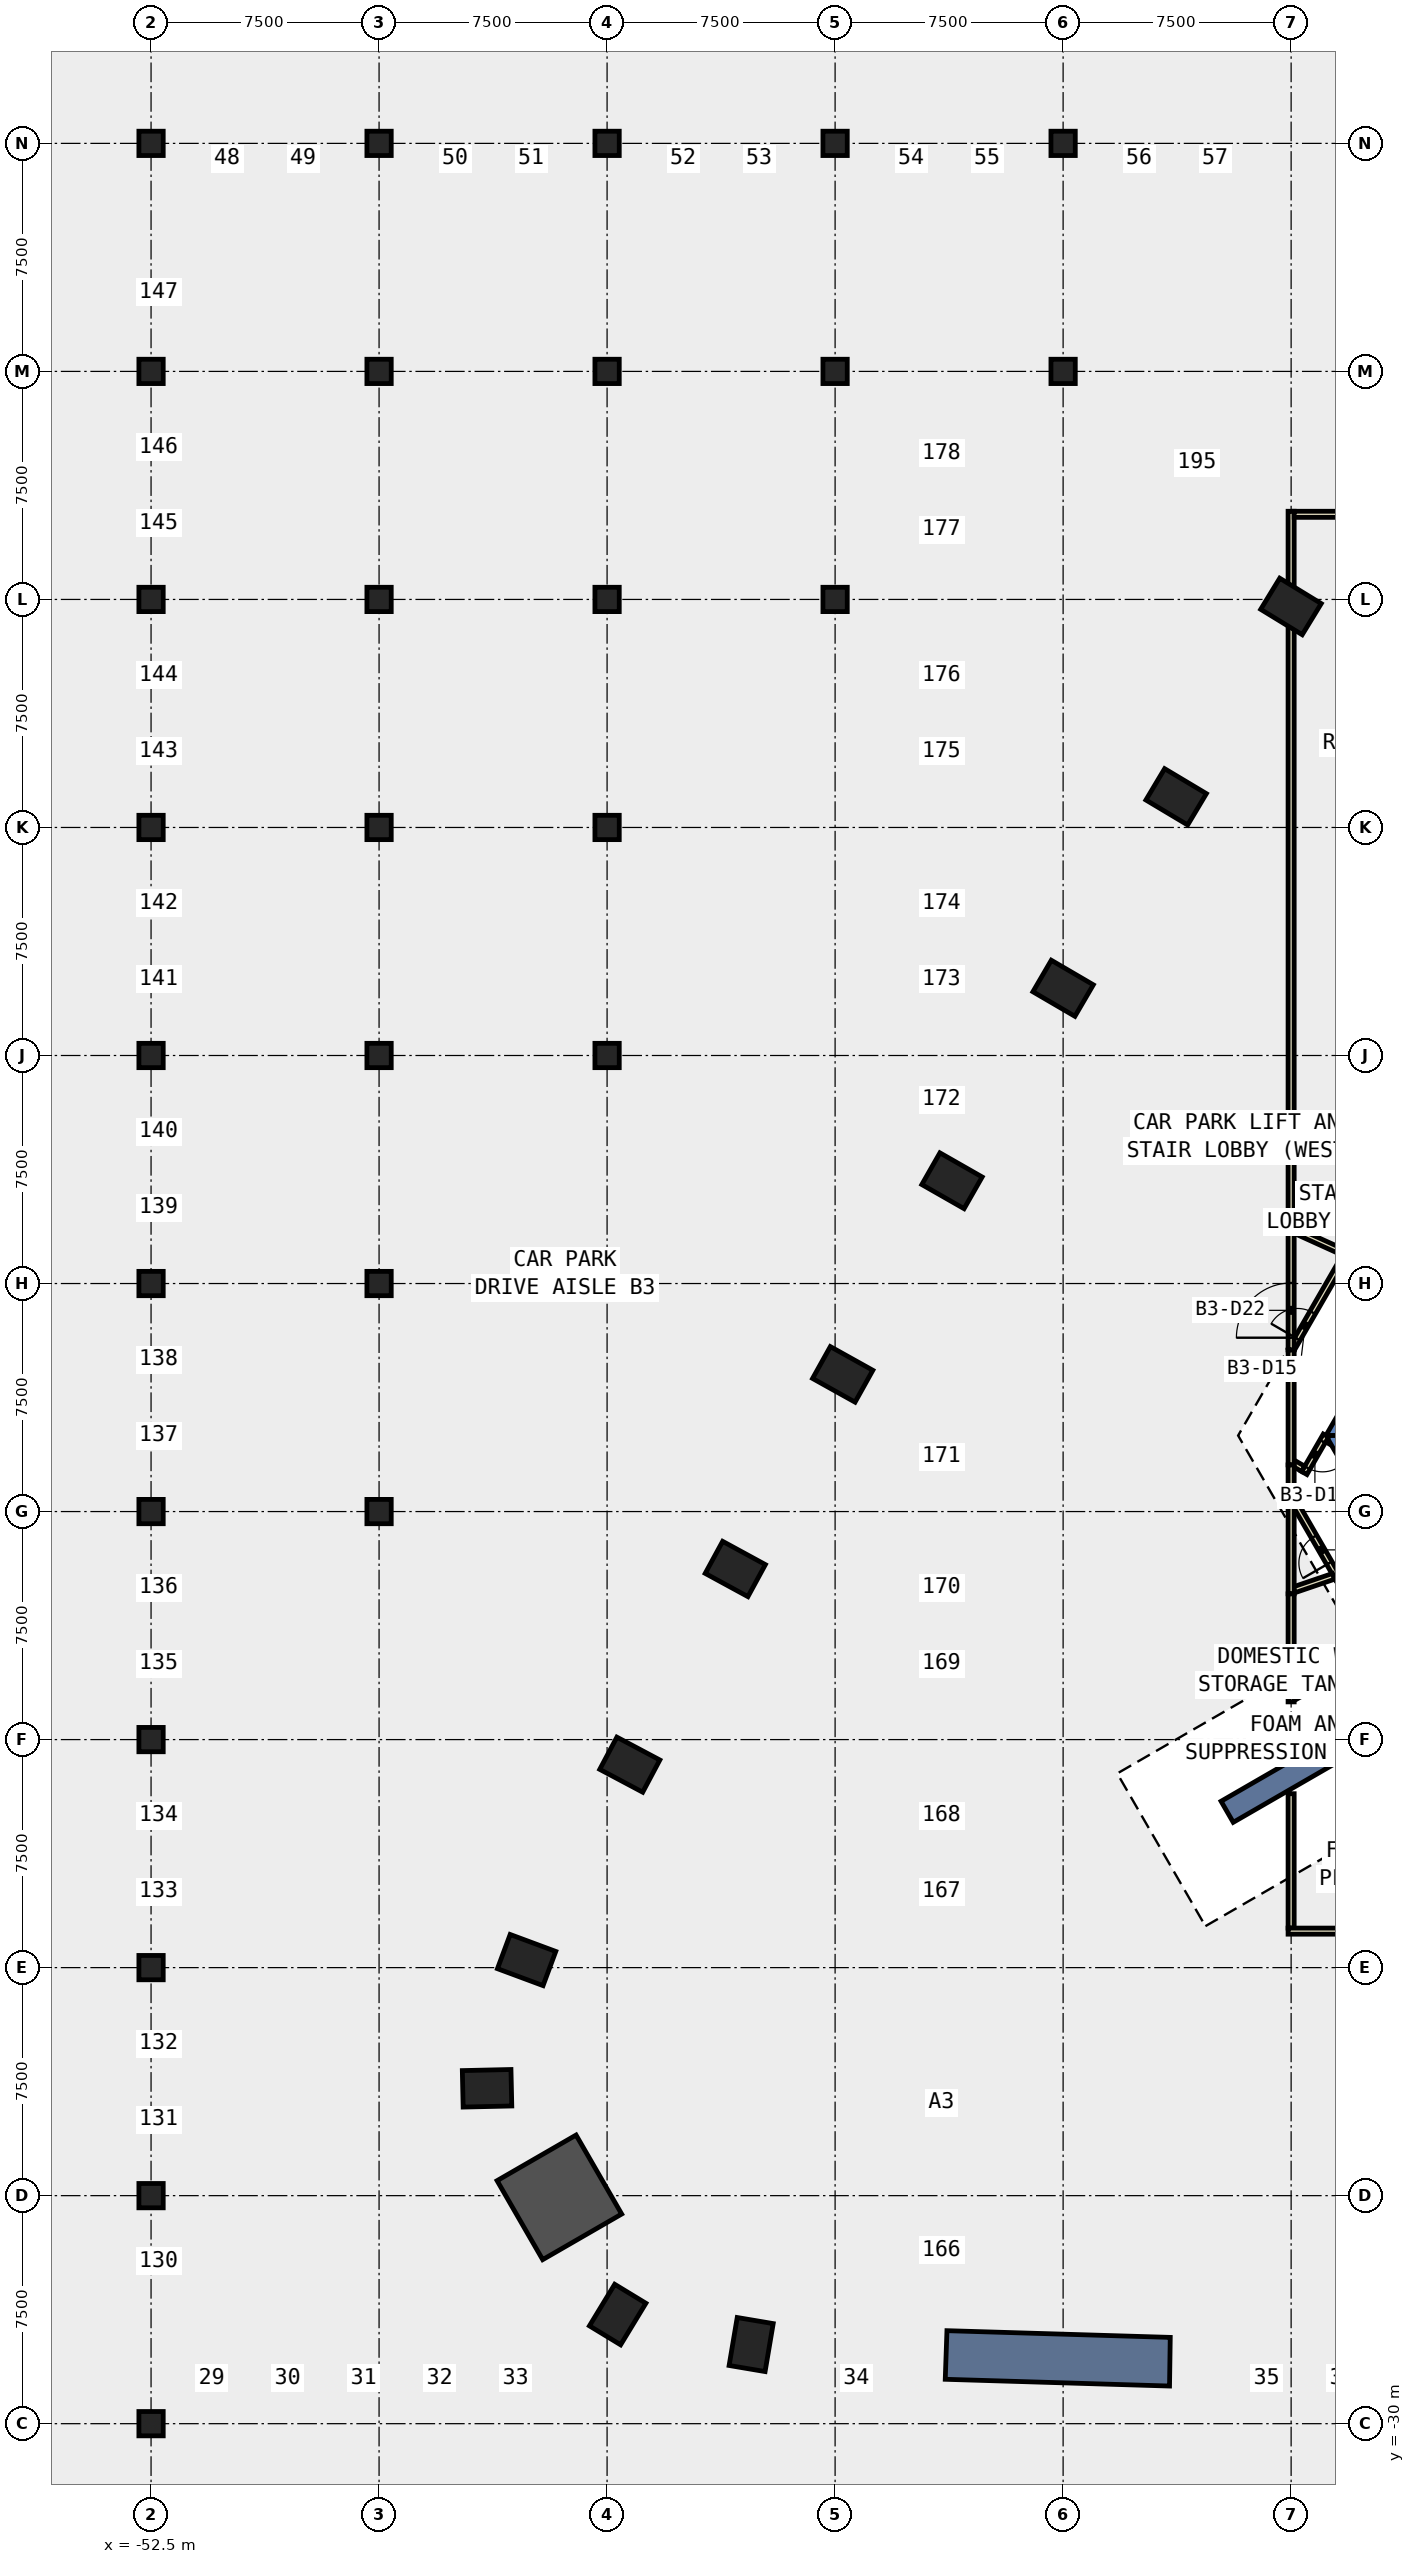
"""IFC4 building model, lengths in metres.
Left out: names, types, materials, properties, quantities, classifications, styles, units other than length and angle.
Written with IfcOpenShell. Run it as: python <this file> out.ifc"""

import sys

from ifc_helpers import new_model, si_unit, direction, frame, frame_2d, origin, origin_2d, place, context, subcontext, project, spatial, polyline, rectangle, outline, extrude, element, fill, save


model = new_model("IFC4")
c1 = context("Model", 3, precision=1e-05, world=origin(), true_north=direction((0.0, 1.0)))
c2 = subcontext(c1, "Body", "Model", "MODEL_VIEW")
j1 = project(units=[si_unit("LENGTHUNIT", "METRE"), si_unit("PLANEANGLEUNIT", "RADIAN")], contexts=[c1])
p1 = place(None, origin())
s1 = spatial("IfcSite", under=j1, at=p1, CompositionType="ELEMENT")
p2 = place(p1, origin())
s2 = spatial("IfcBuilding", under=s1, at=p2, CompositionType="ELEMENT")
p3 = place(p2, frame((0.0, 0.0, -16.5)))
s3 = spatial("IfcBuildingStorey", under=s2, at=p3, CompositionType="ELEMENT", Elevation=-16.5)
for number, where, z_axis, x_axis in (
    (1, (-52.5, -30.0, -0.4), (0.0, 0.0, 1.0), (1.0, 0.0, 0.0)),
    (2, (-52.5, -22.5, -0.4), (0.0, 0.0, 1.0), (1.0, 0.0, 0.0)),
    (3, (-52.5, -15.0, -0.4), (0.0, 0.0, 1.0), (1.0, 0.0, 0.0)),
    (4, (-52.5, -7.5, -0.4), (0.0, 0.0, 1.0), (1.0, 0.0, 0.0)),
    (5, (-52.5, 0.0, -0.4), (0.0, 0.0, 1.0), (1.0, 0.0, 0.0)),
    (6, (-52.5, 7.5, -0.4), (0.0, 0.0, 1.0), (1.0, 0.0, 0.0)),
    (7, (-52.5, 15.0, -0.4), (0.0, 0.0, 1.0), (1.0, 0.0, 0.0)),
    (8, (-52.5, 22.5, -0.4), (0.0, 0.0, 1.0), (1.0, 0.0, 0.0)),
    (9, (-52.5, 30.0, -0.4), (0.0, 0.0, 1.0), (1.0, 0.0, 0.0)),
    (10, (-52.5, 37.5, -0.4), (0.0, 0.0, 1.0), (1.0, 0.0, 0.0)),
    (11, (-52.5, 45.0, -0.4), (0.0, 0.0, 1.0), (1.0, 0.0, 0.0)),
    (12, (-45.0, 0.0, -0.4), (0.0, 0.0, 1.0), (1.0, 0.0, 0.0)),
    (13, (-45.0, 7.5, -0.4), (0.0, 0.0, 1.0), (1.0, 0.0, 0.0)),
    (14, (-45.0, 15.0, -0.4), (0.0, 0.0, 1.0), (1.0, 0.0, 0.0)),
    (15, (-45.0, 22.5, -0.4), (0.0, 0.0, 1.0), (1.0, 0.0, 0.0)),
    (16, (-45.0, 30.0, -0.4), (0.0, 0.0, 1.0), (1.0, 0.0, 0.0)),
    (17, (-45.0, 37.5, -0.4), (0.0, 0.0, 1.0), (1.0, 0.0, 0.0)),
    (18, (-45.0, 45.0, -0.4), (0.0, 0.0, 1.0), (1.0, 0.0, 0.0)),
    (19, (-37.5, 15.0, -0.4), (0.0, 0.0, 1.0), (1.0, 0.0, 0.0)),
    (20, (-37.5, 22.5, -0.4), (0.0, 0.0, 1.0), (1.0, 0.0, 0.0)),
    (21, (-37.5, 30.0, -0.4), (0.0, 0.0, 1.0), (1.0, 0.0, 0.0)),
    (22, (-37.5, 37.5, -0.4), (0.0, 0.0, 1.0), (1.0, 0.0, 0.0)),
    (23, (-37.5, 45.0, -0.4), (0.0, 0.0, 1.0), (1.0, 0.0, 0.0)),
    (24, (-30.0, 30.0, -0.4), (0.0, 0.0, 1.0), (1.0, 0.0, 0.0)),
    (25, (-30.0, 37.5, -0.4), (0.0, 0.0, 1.0), (1.0, 0.0, 0.0)),
    (26, (-30.0, 45.0, -0.4), (0.0, 0.0, 1.0), (1.0, 0.0, 0.0)),
    (27, (-22.5, 37.5, -0.4), (0.0, 0.0, 1.0), (1.0, 0.0, 0.0)),
    (28, (-22.5, 45.0, -0.4), (0.0, 0.0, 1.0), (1.0, 0.0, 0.0)),
):
    element("IfcColumn", number, at=place(p3, frame(where, z_axis=z_axis, x_axis=x_axis)), inside=s3, PredefinedType="COLUMN", context=c2, shape_type="SweptSolid", body=[
        extrude(rectangle(XDim=0.8, YDim=0.8, at=origin_2d()), origin(), (0.0, 0.0, 1.0), 5.48),
    ])
for number, where, z_axis, x_axis in (
    (29, (-32.761, -27.397, -0.4), (0.0, 0.0, 1.0), (-0.986, 0.167, 0.0)),
    (30, (-15.005, 29.769, -0.4), (0.0, 0.0, 1.0), (0.522, 0.853, 0.0)),
    (31, (-18.782, 23.508, -0.4), (0.0, 0.0, 1.0), (0.513, 0.858, 0.0)),
    (32, (-22.5, 17.211, -0.4), (0.0, 0.0, 1.0), (0.504, 0.864, 0.0)),
    (33, (-26.155, 10.88, -0.4), (0.0, 0.0, 1.0), (0.496, 0.869, 0.0)),
    (34, (-29.75, 4.512, -0.4), (0.0, 0.0, 1.0), (0.487, 0.873, 0.0)),
    (35, (-33.283, -1.889, -0.4), (0.0, 0.0, 1.0), (0.478, 0.878, 0.0)),
    (36, (-36.753, -8.325, -0.4), (0.0, 0.0, 1.0), (0.469, 0.883, 0.0)),
    (37, (-40.147, -14.751, -0.4), (0.0, 0.0, 1.0), (0.348, 0.937, 0.0)),
    (38, (-41.448, -18.969, -0.4), (0.0, 0.0, 1.0), (-0.023, 1.0, 0.0)),
):
    element("IfcColumn", number, at=place(p3, frame(where, z_axis=z_axis, x_axis=x_axis)), inside=s3, PredefinedType="COLUMN", context=c2, shape_type="SweptSolid", body=[
        extrude(rectangle(XDim=1.2, YDim=1.6, at=origin_2d()), origin(), (0.0, 0.0, 1.0), 5.48),
    ])
p4 = place(p3, frame((-39.069, -22.556, -0.4), z_axis=(0.0, 0.0, 1.0), x_axis=(0.866025403784, 0.5, 0.0)))
e39 = element("IfcColumn", 39, at=p4, inside=s3, PredefinedType="COLUMN", context=c2, shape_type="SweptSolid", body=[
    extrude(rectangle(XDim=3.0, YDim=3.0, at=origin_2d()), origin(), (0.0, 0.0, 1.0), 5.48),
])
p5 = place(p3, frame((-37.152, -26.411, -0.4), z_axis=(0.0, 0.0, 1.0), x_axis=(-0.854522294989, 0.519414716163, 0.0)))
e40 = element("IfcColumn", 40, at=p5, inside=s3, PredefinedType="COLUMN", context=c2, shape_type="SweptSolid", body=[
    extrude(rectangle(XDim=1.2, YDim=1.6, at=origin_2d()), origin(), (0.0, 0.0, 1.0), 5.48),
])
p6 = place(p3, frame((0.0, 0.0, -0.4)))
e41 = element("IfcWall", 41, at=p6, inside=s3, PredefinedType="SHEAR", context=c2, shape_type="SweptSolid", body=[
    extrude(outline(polyline([(-26.377, -28.54), (-19.0, -28.762), (-18.976, -27.162), (-26.321, -26.941), (-26.377, -28.54)])), origin(), (0.0, 0.0, 1.0), 5.48),
])
p7 = place(p3, origin())
e42 = element("IfcWall", 42, at=p7, inside=s3, PredefinedType="SHEAR", context=c2, shape_type="SweptSolid", body=[
    extrude(outline(polyline([(-12.402, 3.02), (-13.267, 3.52), (-13.856, 2.5), (-12.702, 2.5), (-12.402, 3.02)])), origin(), (0.0, 0.0, 1.0), 5.08),
])
p8 = place(p3, origin())
e43 = element("IfcWall", 43, at=p8, inside=s3, PredefinedType="SHEAR", context=c2, shape_type="SweptSolid", body=[
    extrude(outline(polyline([(-13.856, 2.5), (-6.928, -9.5), (-6.351, -8.5), (-12.702, 2.5), (-13.856, 2.5)])), origin(), (0.0, 0.0, 1.0), 5.08),
])
p9 = place(p3, frame((-9.31, -5.375, 0.0), z_axis=(0.0, 0.0, 1.0), x_axis=(-0.866017533419, -0.500013631625, 0.0)))
e44 = element("IfcWall", 44, at=p9, inside=s3, PredefinedType="SHEAR", context=c2, shape_type="SweptSolid", body=[
    extrude(rectangle(XDim=9.0, YDim=0.8, at=frame_2d((4.5, 0.0))), origin(), (0.0, 0.0, 1.0), 5.08),
])
p10 = place(p3, frame((-15.0, -13.7, 0.0), z_axis=(0.0, 0.0, 1.0), x_axis=(0.0, 1.0, 0.0)))
e45 = element("IfcWall", 45, at=p10, inside=s3, PredefinedType="PARTITIONING", context=c2, shape_type="SweptSolid", body=[
    extrude(rectangle(XDim=4.42, YDim=0.2, at=frame_2d((2.21, 0.0))), origin(), (0.0, 0.0, 1.0), 5.08),
])
p11 = place(p3, frame((-8.278, -13.8, 0.0), z_axis=(0.0, 0.0, 1.0), x_axis=(-1.0, 0.0, 0.0)))
e46 = element("IfcWall", 46, at=p11, inside=s3, PredefinedType="PARTITIONING", context=c2, shape_type="SweptSolid", body=[
    extrude(rectangle(XDim=6.822, YDim=0.2, at=frame_2d((3.411, 0.0))), origin(), (0.0, 0.0, 1.0), 5.08),
])
p12 = place(p3, frame((-13.856, 2.5, 0.0), z_axis=(0.0, 0.0, 1.0), x_axis=(-0.499831418649, -0.866122712398, 0.0)))
e47 = element("IfcWall", 47, at=p12, inside=s3, PredefinedType="PARTITIONING", context=c2, shape_type="SweptSolid", body=[
    extrude(rectangle(XDim=1.422, YDim=0.2, at=frame_2d((0.711, 0.0))), origin(), (0.0, 0.0, 1.0), 5.08),
])
p13 = place(p12, frame((0.224, 0.0, 0.0)))
e48 = element("IfcOpeningElement", 48, at=p13, cuts=e47, PredefinedType="OPENING", context=c2, shape_type="SweptSolid", body=[
    extrude(rectangle(XDim=1.0, YDim=2.1, at=frame_2d((0.5, 1.05))), frame((0.0, 0.11, 0.0), z_axis=(0.0, -1.0, 0.0), x_axis=(1.0, 0.0, 0.0)), (0.0, 0.0, 1.0), 0.22),
])
p14 = place(p3, frame((-14.604, 1.405, 0.0), z_axis=(0.0, 0.0, 1.0), x_axis=(-0.865410684717, 0.501063216349, 0.0)))
e49 = element("IfcWall", 49, at=p14, inside=s3, PredefinedType="PARTITIONING", context=c2, shape_type="SweptSolid", body=[
    extrude(rectangle(XDim=0.357, YDim=0.2, at=frame_2d((0.179, 0.0))), origin(), (0.0, 0.0, 1.0), 5.08),
])
p15 = place(p3, frame((-15.0, 5.318, 0.0), z_axis=(0.0, 0.0, 1.0), x_axis=(0.500034145141, 0.866005689181, 0.0)))
e50 = element("IfcWall", 50, at=p15, inside=s3, PredefinedType="PARTITIONING", context=c2, shape_type="SweptSolid", body=[
    extrude(rectangle(XDim=3.91, YDim=0.2, at=frame_2d((1.955, 0.0))), origin(), (0.0, 0.0, 1.0), 5.08),
])
p16 = place(p15, frame((0.418, 0.0, 0.0)))
e51 = element("IfcOpeningElement", 51, at=p16, cuts=e50, PredefinedType="OPENING", context=c2, shape_type="SweptSolid", body=[
    extrude(rectangle(XDim=1.0, YDim=2.1, at=frame_2d((0.5, 1.05))), frame((0.0, 0.11, 0.0), z_axis=(0.0, -1.0, 0.0), x_axis=(1.0, 0.0, 0.0)), (0.0, 0.0, 1.0), 0.22),
])
p17 = place(p3, frame((-15.0, 1.534, 0.0), z_axis=(0.0, 0.0, 1.0), x_axis=(0.0, 1.0, 0.0)))
e52 = element("IfcWall", 52, at=p17, inside=s3, PredefinedType="PARTITIONING", context=c2, shape_type="SweptSolid", body=[
    extrude(rectangle(XDim=3.784, YDim=0.2, at=frame_2d((1.892, 0.0))), origin(), (0.0, 0.0, 1.0), 5.08),
])
p18 = place(p3, frame((-13.46, -2.186, 0.0), z_axis=(0.0, 0.0, 1.0), x_axis=(-0.500060979923, 0.865990194147, 0.0)))
e53 = element("IfcWall", 53, at=p18, inside=s3, PredefinedType="PARTITIONING", context=c2, shape_type="SweptSolid", body=[
    extrude(rectangle(XDim=3.08, YDim=0.2, at=frame_2d((1.54, 0.0))), origin(), (0.0, 0.0, 1.0), 5.08),
])
p19 = place(p18, frame((0.569, 0.0, 0.0)))
e54 = element("IfcOpeningElement", 54, at=p19, cuts=e53, PredefinedType="OPENING", context=c2, shape_type="SweptSolid", body=[
    extrude(rectangle(XDim=1.0, YDim=2.1, at=frame_2d((0.5, 1.05))), frame((0.0, 0.11, 0.0), z_axis=(0.0, -1.0, 0.0), x_axis=(1.0, 0.0, 0.0)), (0.0, 0.0, 1.0), 0.22),
])
p20 = place(p3, frame((-15.0, 0.581, 0.0), z_axis=(0.0, 0.0, 1.0), x_axis=(0.0, 1.0, 0.0)))
e55 = element("IfcWall", 55, at=p20, inside=s3, PredefinedType="PARTITIONING", context=c2, shape_type="SweptSolid", body=[
    extrude(rectangle(XDim=0.953, YDim=0.2, at=frame_2d((0.477, 0.0))), origin(), (0.0, 0.0, 1.0), 5.08),
])
p21 = place(p3, frame((-14.909, 9.264, 0.0), z_axis=(0.0, 0.0, 1.0), x_axis=(0.910722060418, -0.41301976789, 0.0)))
e56 = element("IfcWall", 56, at=p21, inside=s3, PredefinedType="PARTITIONING", context=c2, shape_type="SweptSolid", body=[
    extrude(rectangle(XDim=1.903, YDim=0.2, at=frame_2d((0.951, 0.0))), origin(), (0.0, 0.0, 1.0), 5.08),
])
p22 = place(p3, frame((-15.0, 5.318, 0.0), z_axis=(0.0, 0.0, 1.0), x_axis=(0.0, 1.0, 0.0)))
e57 = element("IfcWall", 57, at=p22, inside=s3, PredefinedType="PARTITIONING", context=c2, shape_type="SweptSolid", body=[
    extrude(rectangle(XDim=4.087, YDim=0.2, at=frame_2d((2.043, 0.0))), origin(), (0.0, 0.0, 1.0), 5.08),
])
p23 = place(p22, frame((0.4, 0.0, 0.0)))
e58 = element("IfcOpeningElement", 58, at=p23, cuts=e57, PredefinedType="OPENING", context=c2, shape_type="SweptSolid", body=[
    extrude(rectangle(XDim=1.8, YDim=2.1, at=frame_2d((0.9, 1.05))), frame((0.0, 0.11, 0.0), z_axis=(0.0, -1.0, 0.0), x_axis=(1.0, 0.0, 0.0)), (0.0, 0.0, 1.0), 0.22),
])
p24 = place(p3, frame((-15.0, 9.405, 0.0), z_axis=(0.0, 0.0, 1.0), x_axis=(0.0, 1.0, 0.0)))
e59 = element("IfcWall", 59, at=p24, inside=s3, PredefinedType="PARTITIONING", context=c2, shape_type="SweptSolid", body=[
    extrude(rectangle(XDim=23.495, YDim=0.2, at=frame_2d((11.748, 0.0))), origin(), (0.0, 0.0, 1.0), 5.08),
])
p25 = place(p3, frame((-14.9, 32.8, 0.0), z_axis=(0.0, 0.0, 1.0), x_axis=(1.0, 0.0, 0.0)))
e60 = element("IfcWall", 60, at=p25, inside=s3, PredefinedType="PARTITIONING", context=c2, shape_type="SweptSolid", body=[
    extrude(rectangle(XDim=15.0, YDim=0.2, at=frame_2d((7.5, 0.0))), origin(), (0.0, 0.0, 1.0), 5.08),
])
p26 = place(p3, frame((-13.605, -2.131, 0.0), z_axis=(0.0, 0.0, 1.0), x_axis=(-0.946582963452, -0.32246037478, 0.0)))
e61 = element("IfcWall", 61, at=p26, inside=s3, PredefinedType="PARTITIONING", context=c2, shape_type="SweptSolid", body=[
    extrude(rectangle(XDim=1.373, YDim=0.2, at=frame_2d((0.687, 0.0))), origin(), (0.0, 0.0, 1.0), 5.08),
])
p27 = place(p3, frame((-15.0, -2.706, 0.0), z_axis=(0.0, 0.0, 1.0), x_axis=(0.0, 1.0, 0.0)))
e62 = element("IfcWall", 62, at=p27, inside=s3, PredefinedType="PARTITIONING", context=c2, shape_type="SweptSolid", body=[
    extrude(rectangle(XDim=3.287, YDim=0.2, at=frame_2d((1.644, 0.0))), origin(), (0.0, 0.0, 1.0), 5.08),
])
p28 = place(p3, frame((-12.037, -4.45, 0.0), z_axis=(0.0, 0.0, 1.0), x_axis=(-0.866063163075, -0.499934593286, 0.0)))
e63 = element("IfcWall", 63, at=p28, inside=s3, PredefinedType="PARTITIONING", context=c2, shape_type="SweptSolid", body=[
    extrude(rectangle(XDim=3.321, YDim=0.2, at=frame_2d((1.66, 0.0))), origin(), (0.0, 0.0, 1.0), 5.08),
])
p29 = place(p3, frame((-15.0, -6.26, 0.0), z_axis=(0.0, 0.0, 1.0), x_axis=(0.0, 1.0, 0.0)))
e64 = element("IfcWall", 64, at=p29, inside=s3, PredefinedType="PARTITIONING", context=c2, shape_type="SweptSolid", body=[
    extrude(rectangle(XDim=3.554, YDim=0.2, at=frame_2d((1.777, 0.0))), origin(), (0.0, 0.0, 1.0), 5.08),
])
p30 = place(p13, origin())
e65 = element("IfcDoor", 65, at=p30, inside=s3, OperationType="SINGLE_SWING_RIGHT", PredefinedType="DOOR", context=c2, shape_type="SweptSolid", body=[
    extrude(rectangle(XDim=1.0, YDim=2.1, at=frame_2d((0.5, 1.05))), frame((0.0, 0.025, 0.0), z_axis=(0.0, -1.0, 0.0), x_axis=(1.0, 0.0, 0.0)), (0.0, 0.0, 1.0), 0.05),
])
fill(e48, e65)
p31 = place(p16, origin())
e66 = element("IfcDoor", 66, at=p31, inside=s3, OperationType="SINGLE_SWING_LEFT", PredefinedType="DOOR", context=c2, shape_type="SweptSolid", body=[
    extrude(rectangle(XDim=1.0, YDim=2.1, at=frame_2d((0.5, 1.05))), frame((0.0, 0.025, 0.0), z_axis=(0.0, -1.0, 0.0), x_axis=(1.0, 0.0, 0.0)), (0.0, 0.0, 1.0), 0.05),
])
fill(e51, e66)
p32 = place(p19, origin())
e67 = element("IfcDoor", 67, at=p32, inside=s3, OperationType="SINGLE_SWING_LEFT", PredefinedType="DOOR", context=c2, shape_type="SweptSolid", body=[
    extrude(rectangle(XDim=1.0, YDim=2.1, at=frame_2d((0.5, 1.05))), frame((0.0, 0.025, 0.0), z_axis=(0.0, -1.0, 0.0), x_axis=(1.0, 0.0, 0.0)), (0.0, 0.0, 1.0), 0.05),
])
fill(e54, e67)
p33 = place(p23, origin())
e68 = element("IfcDoor", 68, at=p33, inside=s3, OperationType="DOUBLE_DOOR_SINGLE_SWING", PredefinedType="DOOR", context=c2, shape_type="SweptSolid", body=[
    extrude(rectangle(XDim=1.8, YDim=2.1, at=frame_2d((0.9, 1.05))), frame((0.0, 0.025, 0.0), z_axis=(0.0, -1.0, 0.0), x_axis=(1.0, 0.0, 0.0)), (0.0, 0.0, 1.0), 0.05),
])
fill(e58, e68)
save(model, sys.argv[1])
